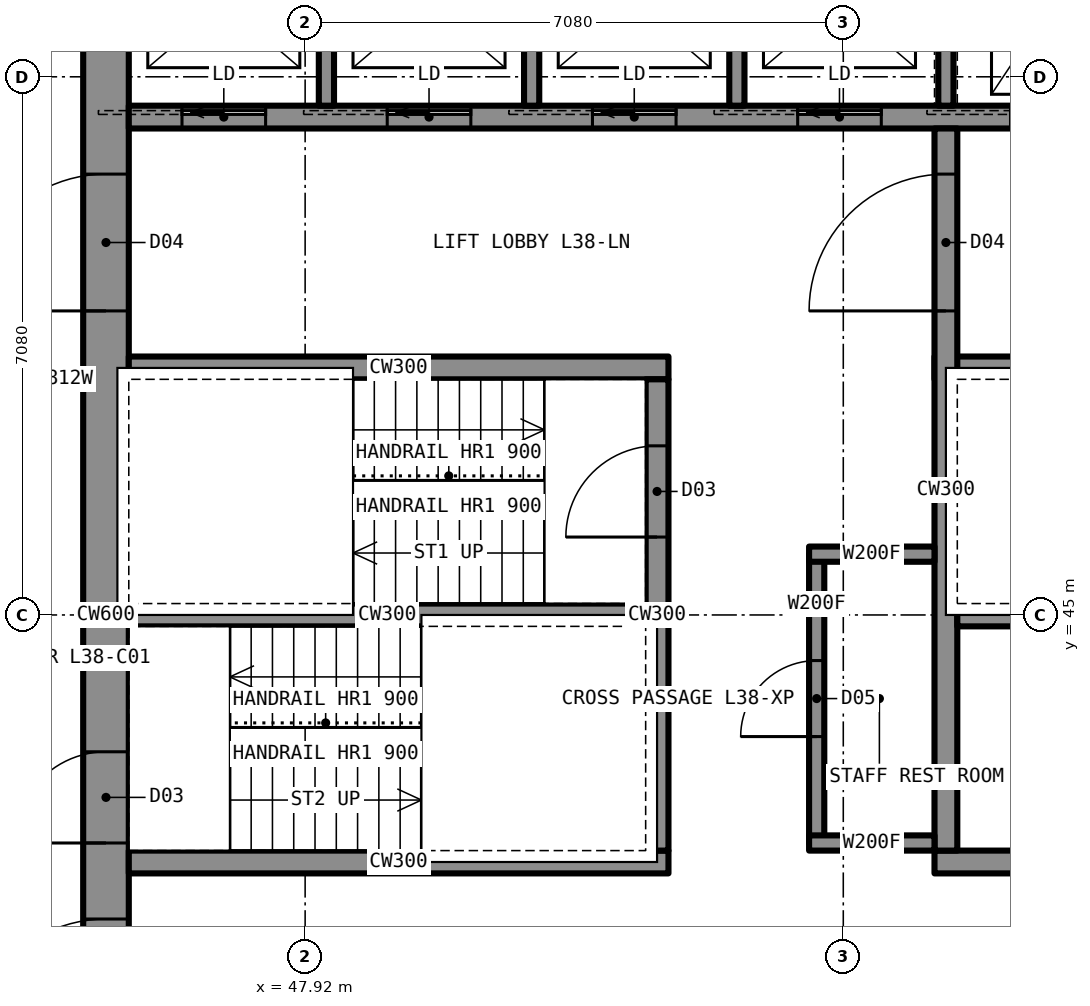
"""IFC4 building model, lengths in metres.
Left out: names, types, materials, properties, quantities, classifications, styles, units other than length and angle.
Written with IfcOpenShell. Run it as: python <this file> out.ifc"""

import sys

from ifc_helpers import new_model, si_unit, direction, frame, frame_2d, origin, place, context, subcontext, project, spatial, rectangle, extrude, element, fill, save


model = new_model("IFC4")
c1 = context("Model", 3, precision=1e-05, world=origin(), true_north=direction((0.0, 1.0)))
c2 = subcontext(c1, "Body", "Model", "MODEL_VIEW")
j1 = project(units=[si_unit("LENGTHUNIT", "METRE"), si_unit("PLANEANGLEUNIT", "RADIAN")], contexts=[c1])
p1 = place(None, origin())
s1 = spatial("IfcSite", under=j1, at=p1, CompositionType="ELEMENT")
p2 = place(p1, origin())
s2 = spatial("IfcBuilding", under=s1, at=p2, CompositionType="ELEMENT")
p3 = place(p2, frame((0.0, 0.0, 135.4)))
s3 = spatial("IfcBuildingStorey", under=s2, at=p3, CompositionType="ELEMENT", Elevation=135.4)
p4 = place(p3, frame((45.3, 35.6, 0.0), z_axis=(0.0, 0.0, 1.0), x_axis=(0.0, 1.0, 0.0)))
e1 = element("IfcWall", 1, at=p4, inside=s3, PredefinedType="SHEAR", context=c2, shape_type="SweptSolid", body=[
    extrude(rectangle(XDim=18.8, YDim=0.6, at=frame_2d((9.4, 0.0))), origin(), (0.0, 0.0, 1.0), 3.5),
])
p5 = place(p4, frame((13.4, 0.0, 0.0)))
e2 = element("IfcOpeningElement", 2, at=p5, cuts=e1, PredefinedType="OPENING", context=c2, shape_type="SweptSolid", body=[
    extrude(rectangle(XDim=1.8, YDim=2.2, at=frame_2d((0.9, 1.1))), frame((0.0, 0.31, 0.0), z_axis=(0.0, -1.0, 0.0), x_axis=(1.0, 0.0, 0.0)), (0.0, 0.0, 1.0), 0.62),
])
p6 = place(p4, frame((3.6, 0.0, 0.0)))
e3 = element("IfcOpeningElement", 3, at=p6, cuts=e1, PredefinedType="OPENING", context=c2, shape_type="SweptSolid", body=[
    extrude(rectangle(XDim=1.8, YDim=2.2, at=frame_2d((0.9, 1.1))), frame((0.0, 0.31, 0.0), z_axis=(0.0, -1.0, 0.0), x_axis=(1.0, 0.0, 0.0)), (0.0, 0.0, 1.0), 0.62),
])
p7 = place(p4, frame((6.4, 0.0, 0.0)))
e4 = element("IfcOpeningElement", 4, at=p7, cuts=e1, PredefinedType="OPENING", context=c2, shape_type="SweptSolid", body=[
    extrude(rectangle(XDim=1.2, YDim=2.2, at=frame_2d((0.6, 1.1))), frame((0.0, 0.31, 0.0), z_axis=(0.0, -1.0, 0.0), x_axis=(1.0, 0.0, 0.0)), (0.0, 0.0, 1.0), 0.62),
])
p8 = place(p3, frame((45.6, 51.55, 0.0), z_axis=(0.0, 0.0, 1.0), x_axis=(1.0, 0.0, 0.0)))
e5 = element("IfcWall", 5, at=p8, inside=s3, PredefinedType="SHEAR", context=c2, shape_type="SweptSolid", body=[
    extrude(rectangle(XDim=18.8, YDim=0.3, at=frame_2d((9.4, 0.0))), origin(), (0.0, 0.0, 1.0), 3.5),
])
p9 = place(p8, frame((0.7, 0.0, 0.0)))
e6 = element("IfcOpeningElement", 6, at=p9, cuts=e5, PredefinedType="OPENING", context=c2, shape_type="SweptSolid", body=[
    extrude(rectangle(XDim=1.1, YDim=2.2, at=frame_2d((0.55, 1.1))), frame((0.0, 0.16, 0.0), z_axis=(0.0, -1.0, 0.0), x_axis=(1.0, 0.0, 0.0)), (0.0, 0.0, 1.0), 0.32),
])
p10 = place(p8, frame((3.4, 0.0, 0.0)))
e7 = element("IfcOpeningElement", 7, at=p10, cuts=e5, PredefinedType="OPENING", context=c2, shape_type="SweptSolid", body=[
    extrude(rectangle(XDim=1.1, YDim=2.2, at=frame_2d((0.55, 1.1))), frame((0.0, 0.16, 0.0), z_axis=(0.0, -1.0, 0.0), x_axis=(1.0, 0.0, 0.0)), (0.0, 0.0, 1.0), 0.32),
])
p11 = place(p8, frame((6.1, 0.0, 0.0)))
e8 = element("IfcOpeningElement", 8, at=p11, cuts=e5, PredefinedType="OPENING", context=c2, shape_type="SweptSolid", body=[
    extrude(rectangle(XDim=1.1, YDim=2.2, at=frame_2d((0.55, 1.1))), frame((0.0, 0.16, 0.0), z_axis=(0.0, -1.0, 0.0), x_axis=(1.0, 0.0, 0.0)), (0.0, 0.0, 1.0), 0.32),
])
p12 = place(p8, frame((8.8, 0.0, 0.0)))
e9 = element("IfcOpeningElement", 9, at=p12, cuts=e5, PredefinedType="OPENING", context=c2, shape_type="SweptSolid", body=[
    extrude(rectangle(XDim=1.1, YDim=2.2, at=frame_2d((0.55, 1.1))), frame((0.0, 0.16, 0.0), z_axis=(0.0, -1.0, 0.0), x_axis=(1.0, 0.0, 0.0)), (0.0, 0.0, 1.0), 0.32),
])
p13 = place(p8, frame((11.6, 0.0, 0.0)))
e10 = element("IfcOpeningElement", 10, at=p13, cuts=e5, PredefinedType="OPENING", context=c2, shape_type="SweptSolid", body=[
    extrude(rectangle(XDim=1.1, YDim=2.2, at=frame_2d((0.55, 1.1))), frame((0.0, 0.16, 0.0), z_axis=(0.0, -1.0, 0.0), x_axis=(1.0, 0.0, 0.0)), (0.0, 0.0, 1.0), 0.32),
])
p14 = place(p8, frame((14.3, 0.0, 0.0)))
e11 = element("IfcOpeningElement", 11, at=p14, cuts=e5, PredefinedType="OPENING", context=c2, shape_type="SweptSolid", body=[
    extrude(rectangle(XDim=1.1, YDim=2.2, at=frame_2d((0.55, 1.1))), frame((0.0, 0.16, 0.0), z_axis=(0.0, -1.0, 0.0), x_axis=(1.0, 0.0, 0.0)), (0.0, 0.0, 1.0), 0.32),
])
p15 = place(p3, frame((45.6, 48.25, 0.0), z_axis=(0.0, 0.0, 1.0), x_axis=(1.0, 0.0, 0.0)))
e12 = element("IfcWall", 12, at=p15, inside=s3, PredefinedType="SHEAR", context=c2, shape_type="SweptSolid", body=[
    extrude(rectangle(XDim=7.1, YDim=0.3, at=frame_2d((3.55, 0.0))), origin(), (0.0, 0.0, 1.0), 3.5),
])
p16 = place(p3, frame((56.2, 48.25, 0.0), z_axis=(0.0, 0.0, 1.0), x_axis=(1.0, 0.0, 0.0)))
e13 = element("IfcWall", 13, at=p16, inside=s3, PredefinedType="SHEAR", context=c2, shape_type="SweptSolid", body=[
    extrude(rectangle(XDim=8.2, YDim=0.3, at=frame_2d((4.1, 0.0))), origin(), (0.0, 0.0, 1.0), 3.5),
])
p17 = place(p16, frame((6.95, 0.0, 0.0)))
e14 = element("IfcOpeningElement", 14, at=p17, cuts=e13, PredefinedType="OPENING", context=c2, shape_type="SweptSolid", body=[
    extrude(rectangle(XDim=1.2, YDim=2.2, at=frame_2d((0.6, 1.1))), frame((0.0, 0.16, 0.0), z_axis=(0.0, -1.0, 0.0), x_axis=(1.0, 0.0, 0.0)), (0.0, 0.0, 1.0), 0.32),
])
p18 = place(p3, frame((45.6, 41.75, 0.0), z_axis=(0.0, 0.0, 1.0), x_axis=(1.0, 0.0, 0.0)))
e15 = element("IfcWall", 15, at=p18, inside=s3, PredefinedType="SHEAR", context=c2, shape_type="SweptSolid", body=[
    extrude(rectangle(XDim=7.1, YDim=0.3, at=frame_2d((3.55, 0.0))), origin(), (0.0, 0.0, 1.0), 3.5),
])
p19 = place(p3, frame((56.2, 41.75, 0.0), z_axis=(0.0, 0.0, 1.0), x_axis=(1.0, 0.0, 0.0)))
e16 = element("IfcWall", 16, at=p19, inside=s3, PredefinedType="SHEAR", context=c2, shape_type="SweptSolid", body=[
    extrude(rectangle(XDim=8.2, YDim=0.3, at=frame_2d((4.1, 0.0))), origin(), (0.0, 0.0, 1.0), 3.5),
])
p20 = place(p19, frame((3.3, 0.0, 0.0)))
e17 = element("IfcOpeningElement", 17, at=p20, cuts=e16, PredefinedType="OPENING", context=c2, shape_type="SweptSolid", body=[
    extrude(rectangle(XDim=1.0, YDim=2.1, at=frame_2d((0.5, 1.05))), frame((0.0, 0.16, 0.0), z_axis=(0.0, -1.0, 0.0), x_axis=(1.0, 0.0, 0.0)), (0.0, 0.0, 1.0), 0.32),
])
p21 = place(p3, frame((52.55, 41.9, 0.0), z_axis=(0.0, 0.0, 1.0), x_axis=(0.0, 1.0, 0.0)))
e18 = element("IfcWall", 18, at=p21, inside=s3, PredefinedType="SHEAR", context=c2, shape_type="SweptSolid", body=[
    extrude(rectangle(XDim=6.2, YDim=0.3, at=frame_2d((3.1, 0.0))), origin(), (0.0, 0.0, 1.0), 3.5),
])
p22 = place(p21, frame((4.125, 0.0, 0.0)))
e19 = element("IfcOpeningElement", 19, at=p22, cuts=e18, PredefinedType="OPENING", context=c2, shape_type="SweptSolid", body=[
    extrude(rectangle(XDim=1.2, YDim=2.2, at=frame_2d((0.6, 1.1))), frame((0.0, 0.16, 0.0), z_axis=(0.0, -1.0, 0.0), x_axis=(1.0, 0.0, 0.0)), (0.0, 0.0, 1.0), 0.32),
])
p23 = place(p3, frame((56.35, 41.9, 0.0), z_axis=(0.0, 0.0, 1.0), x_axis=(0.0, 1.0, 0.0)))
e20 = element("IfcWall", 20, at=p23, inside=s3, PredefinedType="SHEAR", context=c2, shape_type="SweptSolid", body=[
    extrude(rectangle(XDim=9.5, YDim=0.3, at=frame_2d((4.75, 0.0))), origin(), (0.0, 0.0, 1.0), 3.5),
])
p24 = place(p23, frame((7.1, 0.0, 0.0)))
e21 = element("IfcOpeningElement", 21, at=p24, cuts=e20, PredefinedType="OPENING", context=c2, shape_type="SweptSolid", body=[
    extrude(rectangle(XDim=1.8, YDim=2.2, at=frame_2d((0.9, 1.1))), frame((0.0, 0.16, 0.0), z_axis=(0.0, -1.0, 0.0), x_axis=(1.0, 0.0, 0.0)), (0.0, 0.0, 1.0), 0.32),
])
p25 = place(p3, frame((45.6, 45.0, 0.0), z_axis=(0.0, 0.0, 1.0), x_axis=(1.0, 0.0, 0.0)))
e22 = element("IfcWall", 22, at=p25, inside=s3, PredefinedType="SHEAR", context=c2, shape_type="SweptSolid", body=[
    extrude(rectangle(XDim=6.8, YDim=0.3, at=frame_2d((3.4, 0.0))), origin(), (0.0, 0.0, 1.0), 3.5),
])
p26 = place(p3, frame((56.5, 45.0, 0.0), z_axis=(0.0, 0.0, 1.0), x_axis=(1.0, 0.0, 0.0)))
e23 = element("IfcWall", 23, at=p26, inside=s3, PredefinedType="SHEAR", context=c2, shape_type="SweptSolid", body=[
    extrude(rectangle(XDim=7.9, YDim=0.3, at=frame_2d((3.95, 0.0))), origin(), (0.0, 0.0, 1.0), 3.5),
])
for number, where, z_axis, x_axis in (
    (24, (48.2, 51.7, 0.0), (0.0, 0.0, 1.0), (0.0, 1.0, 0.0)),
    (25, (50.9, 51.7, 0.0), (0.0, 0.0, 1.0), (0.0, 1.0, 0.0)),
    (26, (53.6, 51.7, 0.0), (0.0, 0.0, 1.0), (0.0, 1.0, 0.0)),
    (27, (56.35, 51.7, 0.0), (0.0, 0.0, 1.0), (0.0, 1.0, 0.0)),
):
    element("IfcWall", number, at=place(p3, frame(where, z_axis=z_axis, x_axis=x_axis)), inside=s3, PredefinedType="PARTITIONING", context=c2, shape_type="SweptSolid", body=[
        extrude(rectangle(XDim=2.7, YDim=0.2, at=frame_2d((1.35, 0.0))), origin(), (0.0, 0.0, 1.0), 3.33),
    ])
p27 = place(p5, origin())
e28 = element("IfcDoor", 28, at=p27, inside=s3, OperationType="DOUBLE_DOOR_SINGLE_SWING", PredefinedType="DOOR", context=c2, shape_type="SweptSolid", body=[
    extrude(rectangle(XDim=1.8, YDim=2.2, at=frame_2d((0.9, 1.1))), frame((0.0, 0.025, 0.0), z_axis=(0.0, -1.0, 0.0), x_axis=(1.0, 0.0, 0.0)), (0.0, 0.0, 1.0), 0.05),
])
fill(e2, e28)
p28 = place(p6, origin())
e29 = element("IfcDoor", 29, at=p28, inside=s3, OperationType="DOUBLE_DOOR_SINGLE_SWING", PredefinedType="DOOR", context=c2, shape_type="SweptSolid", body=[
    extrude(rectangle(XDim=1.8, YDim=2.2, at=frame_2d((0.9, 1.1))), frame((0.0, 0.025, 0.0), z_axis=(0.0, -1.0, 0.0), x_axis=(1.0, 0.0, 0.0)), (0.0, 0.0, 1.0), 0.05),
])
fill(e3, e29)
p29 = place(p24, origin())
e30 = element("IfcDoor", 30, at=p29, inside=s3, OperationType="DOUBLE_DOOR_SINGLE_SWING", PredefinedType="DOOR", context=c2, shape_type="SweptSolid", body=[
    extrude(rectangle(XDim=1.8, YDim=2.2, at=frame_2d((0.9, 1.1))), frame((0.0, 0.025, 0.0), z_axis=(0.0, -1.0, 0.0), x_axis=(1.0, 0.0, 0.0)), (0.0, 0.0, 1.0), 0.05),
])
fill(e21, e30)
p30 = place(p22, origin())
e31 = element("IfcDoor", 31, at=p30, inside=s3, OperationType="SINGLE_SWING_LEFT", PredefinedType="DOOR", context=c2, shape_type="SweptSolid", body=[
    extrude(rectangle(XDim=1.2, YDim=2.2, at=frame_2d((0.6, 1.1))), frame((0.0, 0.025, 0.0), z_axis=(0.0, -1.0, 0.0), x_axis=(1.0, 0.0, 0.0)), (0.0, 0.0, 1.0), 0.05),
])
fill(e19, e31)
p31 = place(p7, origin())
e32 = element("IfcDoor", 32, at=p31, inside=s3, OperationType="SINGLE_SWING_LEFT", PredefinedType="DOOR", context=c2, shape_type="SweptSolid", body=[
    extrude(rectangle(XDim=1.2, YDim=2.2, at=frame_2d((0.6, 1.1))), frame((0.0, 0.025, 0.0), z_axis=(0.0, -1.0, 0.0), x_axis=(1.0, 0.0, 0.0)), (0.0, 0.0, 1.0), 0.05),
])
fill(e4, e32)
p32 = place(p9, origin())
e33 = element("IfcDoor", 33, at=p32, inside=s3, OperationType="SLIDING_TO_LEFT", PredefinedType="DOOR", context=c2, shape_type="SweptSolid", body=[
    extrude(rectangle(XDim=1.1, YDim=2.2, at=frame_2d((0.55, 1.1))), frame((0.0, 0.025, 0.0), z_axis=(0.0, -1.0, 0.0), x_axis=(1.0, 0.0, 0.0)), (0.0, 0.0, 1.0), 0.05),
])
fill(e6, e33)
p33 = place(p10, origin())
e34 = element("IfcDoor", 34, at=p33, inside=s3, OperationType="SLIDING_TO_LEFT", PredefinedType="DOOR", context=c2, shape_type="SweptSolid", body=[
    extrude(rectangle(XDim=1.1, YDim=2.2, at=frame_2d((0.55, 1.1))), frame((0.0, 0.025, 0.0), z_axis=(0.0, -1.0, 0.0), x_axis=(1.0, 0.0, 0.0)), (0.0, 0.0, 1.0), 0.05),
])
fill(e7, e34)
p34 = place(p11, origin())
e35 = element("IfcDoor", 35, at=p34, inside=s3, OperationType="SLIDING_TO_LEFT", PredefinedType="DOOR", context=c2, shape_type="SweptSolid", body=[
    extrude(rectangle(XDim=1.1, YDim=2.2, at=frame_2d((0.55, 1.1))), frame((0.0, 0.025, 0.0), z_axis=(0.0, -1.0, 0.0), x_axis=(1.0, 0.0, 0.0)), (0.0, 0.0, 1.0), 0.05),
])
fill(e8, e35)
p35 = place(p12, origin())
e36 = element("IfcDoor", 36, at=p35, inside=s3, OperationType="SLIDING_TO_LEFT", PredefinedType="DOOR", context=c2, shape_type="SweptSolid", body=[
    extrude(rectangle(XDim=1.1, YDim=2.2, at=frame_2d((0.55, 1.1))), frame((0.0, 0.025, 0.0), z_axis=(0.0, -1.0, 0.0), x_axis=(1.0, 0.0, 0.0)), (0.0, 0.0, 1.0), 0.05),
])
fill(e9, e36)
save(model, sys.argv[1])
